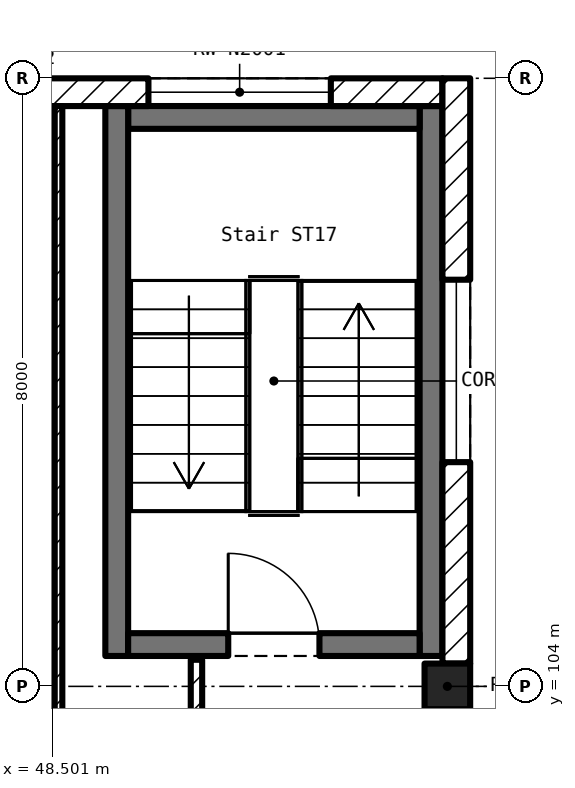
"""IFC4 building model, lengths in metres.
Left out: names, types, materials, properties, quantities, classifications, styles, units other than length and angle.
Written with IfcOpenShell. Run it as: python <this file> out.ifc"""

import sys

from ifc_helpers import new_model, si_unit, direction, frame, frame_2d, origin, origin_2d, place, context, subcontext, project, spatial, rectangle, extrude, element, fill, save


model = new_model("IFC4")
c1 = context("Model", 3, precision=1e-05, world=origin(), true_north=direction((0.0, 1.0)))
c2 = subcontext(c1, "Body", "Model", "MODEL_VIEW")
j1 = project(units=[si_unit("LENGTHUNIT", "METRE"), si_unit("PLANEANGLEUNIT", "RADIAN")], contexts=[c1])
p1 = place(None, origin())
s1 = spatial("IfcSite", under=j1, at=p1, CompositionType="ELEMENT")
p2 = place(p1, origin())
s2 = spatial("IfcBuilding", under=s1, at=p2, CompositionType="ELEMENT")
p3 = place(p2, origin())
s3 = spatial("IfcBuildingStorey", under=s2, at=p3, CompositionType="ELEMENT", Elevation=0.0)
p4 = place(p3, frame((53.7, 104.0, 0.0), z_axis=(0.0, 0.0, 1.0), x_axis=(1.0, 0.0, 0.0)))
e1 = element("IfcColumn", 1, at=p4, inside=s3, PredefinedType="COLUMN", context=c2, shape_type="SweptSolid", body=[
    extrude(rectangle(XDim=0.6, YDim=0.6, at=origin_2d()), origin(), (0.0, 0.0, 1.0), 6.0),
])
p5 = place(p3, frame((53.635, 111.817, 0.0), z_axis=(0.0, 0.0, 1.0), x_axis=(-1.0, 0.0, 0.0)))
e2 = element("IfcWall", 2, at=p5, inside=s3, PredefinedType="SOLIDWALL", context=c2, shape_type="SweptSolid", body=[
    extrude(rectangle(XDim=5.335, YDim=0.365, at=frame_2d((2.667, 0.0))), origin(), (0.0, 0.0, 1.0), 5.05),
])
p6 = place(p5, frame((1.468, 0.0, 1.0)))
e3 = element("IfcOpeningElement", 3, at=p6, cuts=e2, PredefinedType="OPENING", context=c2, shape_type="SweptSolid", body=[
    extrude(rectangle(XDim=2.4, YDim=2.0, at=frame_2d((1.2, 1.0))), frame((0.0, 0.195, 0.0), z_axis=(0.0, -1.0, 0.0), x_axis=(1.0, 0.0, 0.0)), (0.0, 0.0, 1.0), 0.389),
])
p7 = place(p3, frame((53.818, 104.3, 0.0), z_axis=(0.0, 0.0, 1.0), x_axis=(0.0, 1.0, 0.0)))
e4 = element("IfcWall", 4, at=p7, inside=s3, PredefinedType="SOLIDWALL", context=c2, shape_type="SweptSolid", body=[
    extrude(rectangle(XDim=7.7, YDim=0.365, at=frame_2d((3.85, 0.0))), origin(), (0.0, 0.0, 1.0), 5.05),
])
p8 = place(p7, frame((2.65, 0.0, 1.0)))
e5 = element("IfcOpeningElement", 5, at=p8, cuts=e4, PredefinedType="OPENING", context=c2, shape_type="SweptSolid", body=[
    extrude(rectangle(XDim=2.4, YDim=2.0, at=frame_2d((1.2, 1.0))), frame((0.0, 0.195, 0.0), z_axis=(0.0, -1.0, 0.0), x_axis=(1.0, 0.0, 0.0)), (0.0, 0.0, 1.0), 0.389),
])
p9 = place(p3, frame((53.485, 104.4, 0.0), z_axis=(0.0, 0.0, 1.0), x_axis=(0.0, 1.0, 0.0)))
e6 = element("IfcWall", 6, at=p9, inside=s3, PredefinedType="SOLIDWALL", context=c2, shape_type="SweptSolid", body=[
    extrude(rectangle(XDim=7.235, YDim=0.3, at=frame_2d((3.618, 0.0))), origin(), (0.0, 0.0, 1.0), 6.0),
])
p10 = place(p3, frame((53.335, 111.485, 0.0), z_axis=(0.0, 0.0, 1.0), x_axis=(-1.0, 0.0, 0.0)))
e7 = element("IfcWall", 7, at=p10, inside=s3, PredefinedType="SOLIDWALL", context=c2, shape_type="SweptSolid", body=[
    extrude(rectangle(XDim=3.835, YDim=0.3, at=frame_2d((1.917, 0.0))), origin(), (0.0, 0.0, 1.0), 6.0),
])
p11 = place(p3, frame((49.35, 111.635, 0.0), z_axis=(0.0, 0.0, 1.0), x_axis=(0.0, -1.0, 0.0)))
e8 = element("IfcWall", 8, at=p11, inside=s3, PredefinedType="SOLIDWALL", context=c2, shape_type="SweptSolid", body=[
    extrude(rectangle(XDim=7.235, YDim=0.3, at=frame_2d((3.618, 0.0))), origin(), (0.0, 0.0, 1.0), 6.0),
])
p12 = place(p3, frame((49.5, 104.55, 0.0), z_axis=(0.0, 0.0, 1.0), x_axis=(1.0, 0.0, 0.0)))
e9 = element("IfcWall", 9, at=p12, inside=s3, PredefinedType="SOLIDWALL", context=c2, shape_type="SweptSolid", body=[
    extrude(rectangle(XDim=3.835, YDim=0.3, at=frame_2d((1.917, 0.0))), origin(), (0.0, 0.0, 1.0), 6.0),
])
p13 = place(p12, frame((1.317, 0.0, 0.0)))
e10 = element("IfcOpeningElement", 10, at=p13, cuts=e9, PredefinedType="OPENING", context=c2, shape_type="SweptSolid", body=[
    extrude(rectangle(XDim=1.2, YDim=2.1, at=frame_2d((0.6, 1.05))), frame((0.0, 0.162, 0.0), z_axis=(0.0, -1.0, 0.0), x_axis=(1.0, 0.0, 0.0)), (0.0, 0.0, 1.0), 0.324),
])
p14 = place(p3, frame((48.584, 111.634, 0.0), z_axis=(0.0, 0.0, 1.0), x_axis=(0.0, -1.0, 0.0)))
e11 = element("IfcWall", 11, at=p14, inside=s3, PredefinedType="PARTITIONING", context=c2, shape_type="SweptSolid", body=[
    extrude(rectangle(XDim=21.434, YDim=0.1, at=frame_2d((10.717, 0.0))), origin(), (0.0, 0.0, 1.0), 4.95),
])
p15 = place(p14, frame((10.034, 0.0, 0.0)))
e12 = element("IfcOpeningElement", 12, at=p15, cuts=e11, PredefinedType="OPENING", context=c2, shape_type="SweptSolid", body=[
    extrude(rectangle(XDim=1.0, YDim=2.1, at=frame_2d((0.5, 1.05))), frame((0.0, 0.062, 0.0), z_axis=(0.0, -1.0, 0.0), x_axis=(1.0, 0.0, 0.0)), (0.0, 0.0, 1.0), 0.124),
])
p16 = place(p3, frame((50.399, 92.422, 0.0), z_axis=(0.0, 0.0, 1.0), x_axis=(0.0, 1.0, 0.0)))
e13 = element("IfcWall", 13, at=p16, inside=s3, PredefinedType="PARTITIONING", context=c2, shape_type="SweptSolid", body=[
    extrude(rectangle(XDim=11.928, YDim=0.15, at=frame_2d((5.964, 0.0))), origin(), (0.0, 0.0, 1.0), 4.95),
])
p17 = place(p16, frame((5.539, 0.0, 0.0)))
e14 = element("IfcOpeningElement", 14, at=p17, cuts=e13, PredefinedType="OPENING", context=c2, shape_type="SweptSolid", body=[
    extrude(rectangle(XDim=0.9, YDim=2.1, at=frame_2d((0.45, 1.05))), frame((0.0, 0.087, 0.0), z_axis=(0.0, -1.0, 0.0), x_axis=(1.0, 0.0, 0.0)), (0.0, 0.0, 1.0), 0.174),
])
p18 = place(p6, origin())
e15 = element("IfcWindow", 15, at=p18, inside=s3, PartitioningType="DOUBLE_PANEL_VERTICAL", PredefinedType="WINDOW", context=c2, shape_type="SweptSolid", body=[
    extrude(rectangle(XDim=2.4, YDim=2.0, at=frame_2d((1.2, 1.0))), frame((0.0, 0.03, 0.0), z_axis=(0.0, -1.0, 0.0), x_axis=(1.0, 0.0, 0.0)), (0.0, 0.0, 1.0), 0.06),
])
fill(e3, e15)
p19 = place(p8, origin())
e16 = element("IfcWindow", 16, at=p19, inside=s3, PartitioningType="DOUBLE_PANEL_VERTICAL", PredefinedType="WINDOW", context=c2, shape_type="SweptSolid", body=[
    extrude(rectangle(XDim=2.4, YDim=2.0, at=frame_2d((1.2, 1.0))), frame((0.0, 0.03, 0.0), z_axis=(0.0, -1.0, 0.0), x_axis=(1.0, 0.0, 0.0)), (0.0, 0.0, 1.0), 0.06),
])
fill(e5, e16)
p20 = place(p13, origin())
e17 = element("IfcDoor", 17, at=p20, inside=s3, OperationType="SINGLE_SWING_LEFT", PredefinedType="DOOR", context=c2, shape_type="SweptSolid", body=[
    extrude(rectangle(XDim=1.2, YDim=2.1, at=frame_2d((0.6, 1.05))), frame((0.0, 0.025, 0.0), z_axis=(0.0, -1.0, 0.0), x_axis=(1.0, 0.0, 0.0)), (0.0, 0.0, 1.0), 0.05),
])
fill(e10, e17)
save(model, sys.argv[1])
